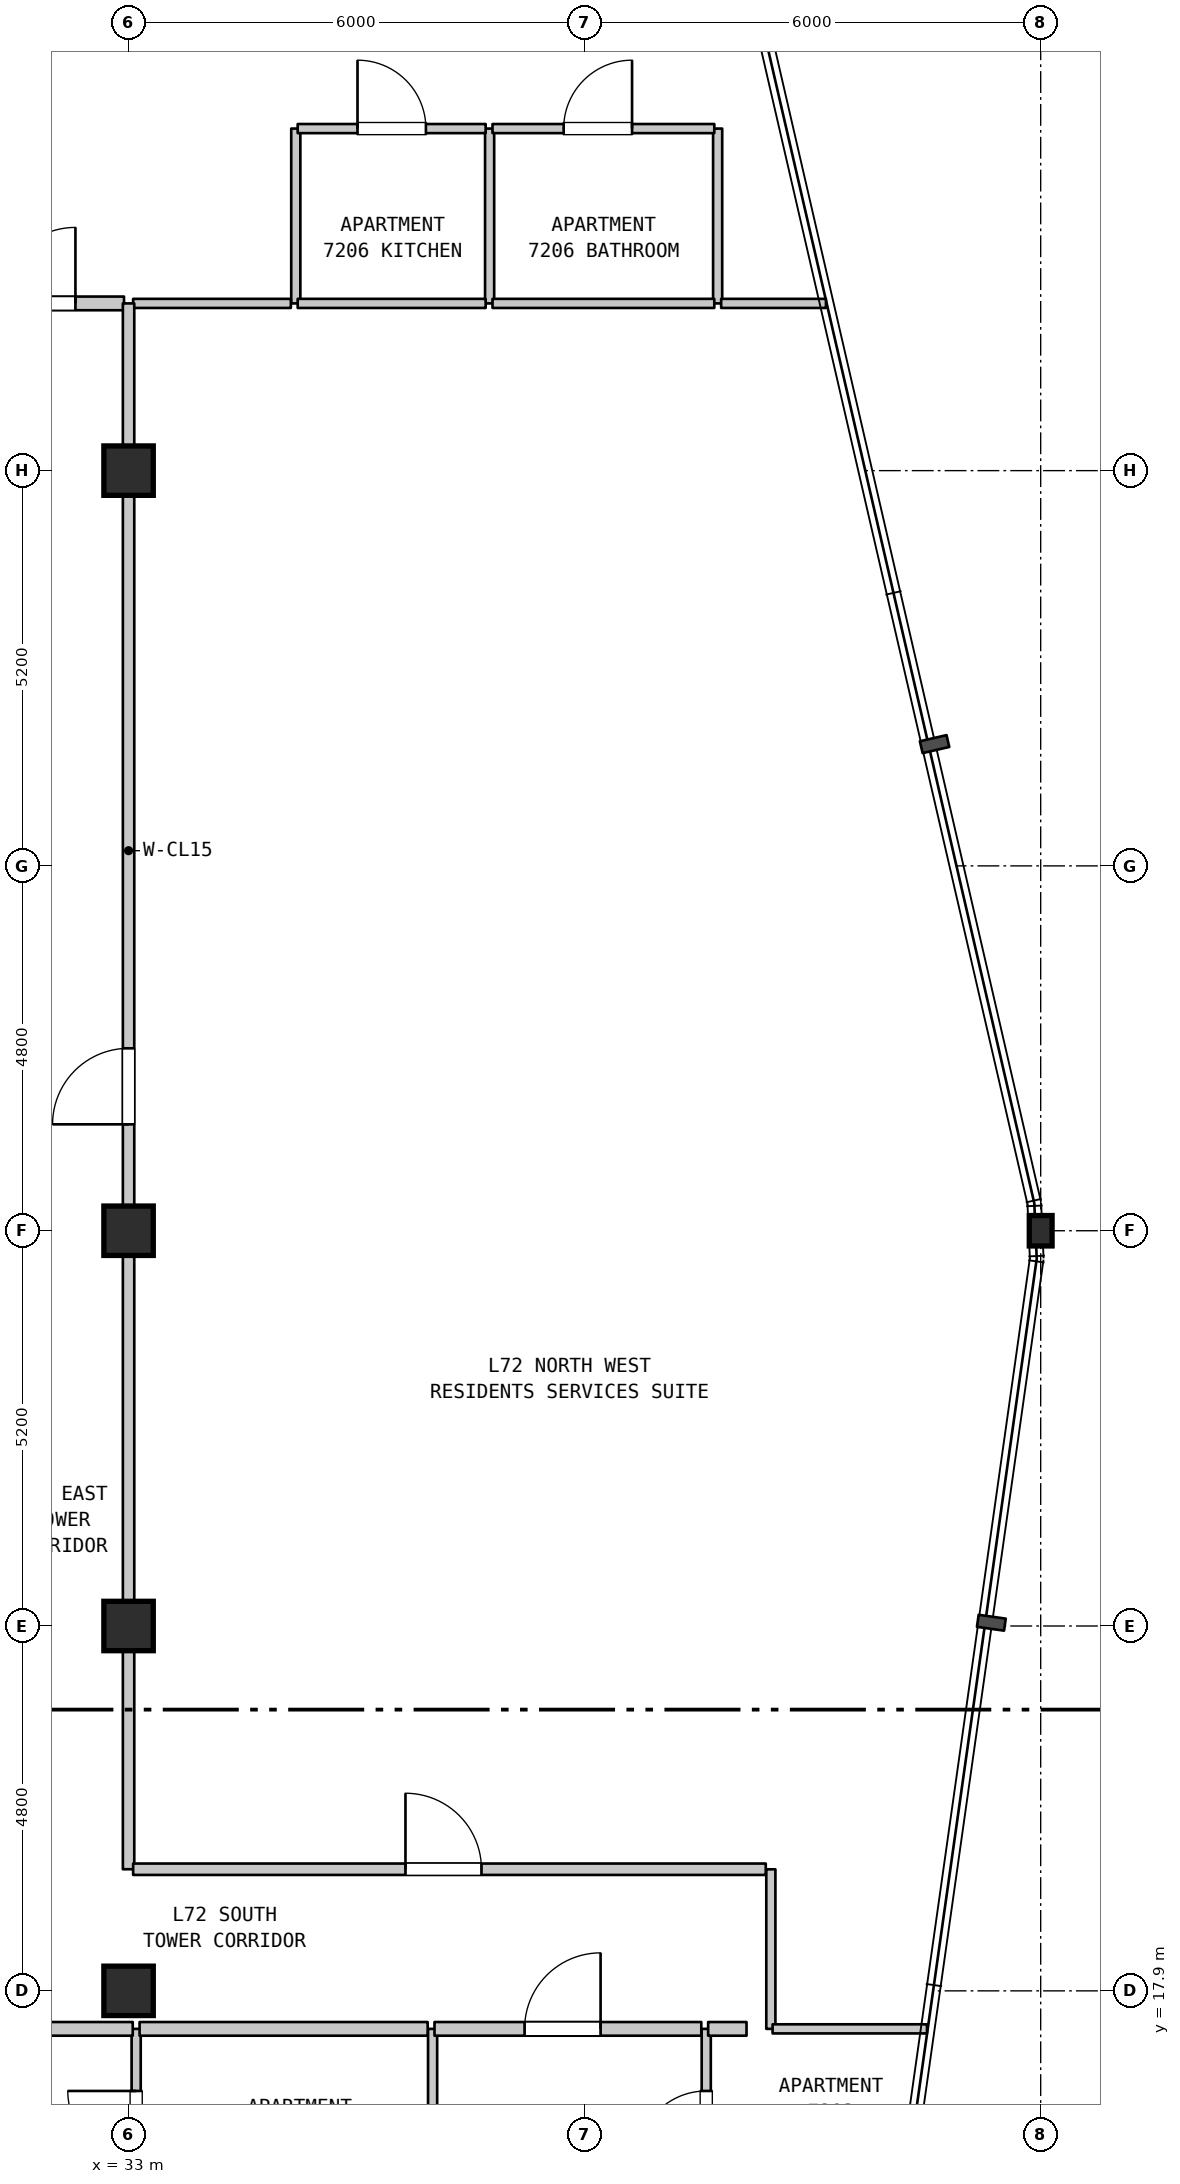
"""IFC4 building model, lengths in metres.
Left out: names, types, materials, properties, quantities, classifications, styles, units other than length and angle.
Written with IfcOpenShell. Run it as: python <this file> out.ifc"""

import sys

from ifc_helpers import new_model, si_unit, direction, frame, frame_2d, origin, origin_2d, place, context, subcontext, project, spatial, rectangle, i_section, extrude, element, fill, save


model = new_model("IFC4")
c1 = context("Model", 3, precision=1e-05, world=origin(), true_north=direction((0.0, 1.0)))
c2 = subcontext(c1, "Body", "Model", "MODEL_VIEW")
j1 = project(units=[si_unit("LENGTHUNIT", "METRE"), si_unit("PLANEANGLEUNIT", "RADIAN")], contexts=[c1])
p1 = place(None, origin())
s1 = spatial("IfcSite", under=j1, at=p1, CompositionType="ELEMENT")
p2 = place(p1, origin())
s2 = spatial("IfcBuilding", under=s1, at=p2, CompositionType="ELEMENT")
p3 = place(p2, frame((0.0, 0.0, 288.0)))
s3 = spatial("IfcBuildingStorey", under=s2, at=p3, CompositionType="ELEMENT", Elevation=288.0)
for number, where, z_axis, x_axis in (
    (1, (33.0, 17.9, 0.0), (0.0, 0.0, 1.0), (1.0, 0.0, 0.0)),
    (2, (33.0, 22.7, 0.0), (0.0, 0.0, 1.0), (1.0, 0.0, 0.0)),
    (3, (33.0, 27.9, 0.0), (0.0, 0.0, 1.0), (1.0, 0.0, 0.0)),
    (4, (33.0, 37.9, 0.0), (0.0, 0.0, 1.0), (1.0, 0.0, 0.0)),
):
    element("IfcColumn", number, at=place(p3, frame(where, z_axis=z_axis, x_axis=x_axis)), inside=s3, PredefinedType="COLUMN", context=c2, shape_type="SweptSolid", body=[
        extrude(rectangle(XDim=0.65, YDim=0.65, at=origin_2d()), origin(), (0.0, 0.0, 1.0), 3.7),
    ])
p4 = place(p3, frame((45.0, 27.9, 0.0), z_axis=(0.0, 0.0, 1.0), x_axis=(1.0, 0.0, 0.0)))
e5 = element("IfcColumn", 5, at=p4, inside=s3, PredefinedType="COLUMN", context=c2, shape_type="SweptSolid", body=[
    extrude(i_section(OverallWidth=0.3, OverallDepth=0.4, WebThickness=0.013, FlangeThickness=0.024, FilletRadius=0.027, at=origin_2d()), origin(), (0.0, 0.0, 1.0), 3.7),
])
p5 = place(p3, frame((33.0, 19.5, 0.0), z_axis=(0.0, 0.0, 1.0), x_axis=(0.0, 1.0, 0.0)))
e6 = element("IfcWall", 6, at=p5, inside=s3, PredefinedType="STANDARD", context=c2, shape_type="SweptSolid", body=[
    extrude(rectangle(XDim=8.4, YDim=0.15, at=frame_2d((4.2, 0.0))), origin(), (0.0, 0.0, 1.0), 3.1),
])
p6 = place(p3, frame((33.1, 15.008, 0.0), z_axis=(0.0, 0.0, 1.0), x_axis=(0.0, 1.0, 0.0)))
e7 = element("IfcWall", 7, at=p6, inside=s3, PredefinedType="PARTITIONING", context=c2, shape_type="SweptSolid", body=[
    extrude(rectangle(XDim=2.392, YDim=0.12, at=frame_2d((1.196, 0.0))), origin(), (0.0, 0.0, 1.0), 3.1),
])
p7 = place(p6, frame((0.675, 0.0, 0.0)))
e8 = element("IfcOpeningElement", 8, at=p7, cuts=e7, PredefinedType="OPENING", context=c2, shape_type="SweptSolid", body=[
    extrude(rectangle(XDim=0.9, YDim=2.1, at=frame_2d((0.45, 1.05))), frame((0.0, 0.07, 0.0), z_axis=(0.0, -1.0, 0.0), x_axis=(1.0, 0.0, 0.0)), (0.0, 0.0, 1.0), 0.14),
])
p8 = place(p3, frame((35.2, 40.1, 0.0), z_axis=(0.0, 0.0, 1.0), x_axis=(0.0, 1.0, 0.0)))
e9 = element("IfcWall", 9, at=p8, inside=s3, PredefinedType="PARTITIONING", context=c2, shape_type="SweptSolid", body=[
    extrude(rectangle(XDim=2.3, YDim=0.12, at=frame_2d((1.15, 0.0))), origin(), (0.0, 0.0, 1.0), 3.39),
])
p9 = place(p3, frame((37.0, 15.008, 0.0), z_axis=(0.0, 0.0, 1.0), x_axis=(0.0, 1.0, 0.0)))
e10 = element("IfcWall", 10, at=p9, inside=s3, PredefinedType="PARTITIONING", context=c2, shape_type="SweptSolid", body=[
    extrude(rectangle(XDim=2.392, YDim=0.12, at=frame_2d((1.196, 0.0))), origin(), (0.0, 0.0, 1.0), 3.39),
])
p10 = place(p3, frame((37.75, 40.1, 0.0), z_axis=(0.0, 0.0, 1.0), x_axis=(0.0, 1.0, 0.0)))
e11 = element("IfcWall", 11, at=p10, inside=s3, PredefinedType="PARTITIONING", context=c2, shape_type="SweptSolid", body=[
    extrude(rectangle(XDim=2.3, YDim=0.12, at=frame_2d((1.15, 0.0))), origin(), (0.0, 0.0, 1.0), 3.39),
])
p11 = place(p3, frame((40.6, 15.008, 0.0), z_axis=(0.0, 0.0, 1.0), x_axis=(0.0, 1.0, 0.0)))
e12 = element("IfcWall", 12, at=p11, inside=s3, PredefinedType="PARTITIONING", context=c2, shape_type="SweptSolid", body=[
    extrude(rectangle(XDim=2.392, YDim=0.12, at=frame_2d((1.196, 0.0))), origin(), (0.0, 0.0, 1.0), 3.39),
])
p12 = place(p11, frame((0.675, 0.0, 0.0)))
e13 = element("IfcOpeningElement", 13, at=p12, cuts=e12, PredefinedType="OPENING", context=c2, shape_type="SweptSolid", body=[
    extrude(rectangle(XDim=0.9, YDim=2.1, at=frame_2d((0.45, 1.05))), frame((0.0, 0.07, 0.0), z_axis=(0.0, -1.0, 0.0), x_axis=(1.0, 0.0, 0.0)), (0.0, 0.0, 1.0), 0.14),
])
p13 = place(p3, frame((40.75, 40.1, 0.0), z_axis=(0.0, 0.0, 1.0), x_axis=(0.0, 1.0, 0.0)))
e14 = element("IfcWall", 14, at=p13, inside=s3, PredefinedType="PARTITIONING", context=c2, shape_type="SweptSolid", body=[
    extrude(rectangle(XDim=2.3, YDim=0.12, at=frame_2d((1.15, 0.0))), origin(), (0.0, 0.0, 1.0), 3.39),
])
p14 = place(p3, frame((41.45, 17.4, 0.0), z_axis=(0.0, 0.0, 1.0), x_axis=(0.0, 1.0, 0.0)))
e15 = element("IfcWall", 15, at=p14, inside=s3, PredefinedType="PARTITIONING", context=c2, shape_type="SweptSolid", body=[
    extrude(rectangle(XDim=2.099, YDim=0.12, at=frame_2d((1.05, 0.0))), origin(), (0.0, 0.0, 1.0), 3.39),
])
p15 = place(p3, frame((29.545, 17.4, 0.0), z_axis=(0.0, 0.0, 1.0), x_axis=(1.0, 0.0, 0.0)))
e16 = element("IfcWall", 16, at=p15, inside=s3, PredefinedType="STANDARD", context=c2, shape_type="SweptSolid", body=[
    extrude(rectangle(XDim=3.51, YDim=0.18, at=frame_2d((1.755, 0.0))), origin(), (0.0, 0.0, 1.0), 3.39),
])
p16 = place(p15, frame((1.185, 0.0, 0.0)))
e17 = element("IfcOpeningElement", 17, at=p16, cuts=e16, PredefinedType="OPENING", context=c2, shape_type="SweptSolid", body=[
    extrude(rectangle(XDim=1.0, YDim=2.15, at=frame_2d((0.5, 1.075))), frame((0.0, 0.1, 0.0), z_axis=(0.0, -1.0, 0.0), x_axis=(1.0, 0.0, 0.0)), (0.0, 0.0, 1.0), 0.2),
])
p17 = place(p3, frame((33.145, 17.4, 0.0), z_axis=(0.0, 0.0, 1.0), x_axis=(1.0, 0.0, 0.0)))
e18 = element("IfcWall", 18, at=p17, inside=s3, PredefinedType="STANDARD", context=c2, shape_type="SweptSolid", body=[
    extrude(rectangle(XDim=3.79, YDim=0.18, at=frame_2d((1.895, 0.0))), origin(), (0.0, 0.0, 1.0), 3.39),
])
p18 = place(p3, frame((37.025, 17.4, 0.0), z_axis=(0.0, 0.0, 1.0), x_axis=(1.0, 0.0, 0.0)))
e19 = element("IfcWall", 19, at=p18, inside=s3, PredefinedType="STANDARD", context=c2, shape_type="SweptSolid", body=[
    extrude(rectangle(XDim=3.51, YDim=0.18, at=frame_2d((1.755, 0.0))), origin(), (0.0, 0.0, 1.0), 3.39),
])
p19 = place(p18, frame((1.185, 0.0, 0.0)))
e20 = element("IfcOpeningElement", 20, at=p19, cuts=e19, PredefinedType="OPENING", context=c2, shape_type="SweptSolid", body=[
    extrude(rectangle(XDim=1.0, YDim=2.15, at=frame_2d((0.5, 1.075))), frame((0.0, 0.1, 0.0), z_axis=(0.0, -1.0, 0.0), x_axis=(1.0, 0.0, 0.0)), (0.0, 0.0, 1.0), 0.2),
])
p20 = place(p3, frame((40.625, 17.4, 0.0), z_axis=(0.0, 0.0, 1.0), x_axis=(1.0, 0.0, 0.0)))
e21 = element("IfcWall", 21, at=p20, inside=s3, PredefinedType="STANDARD", context=c2, shape_type="SweptSolid", body=[
    extrude(rectangle(XDim=0.505, YDim=0.18, at=frame_2d((0.252, 0.0))), origin(), (0.0, 0.0, 1.0), 3.39),
])
p21 = place(p3, frame((41.473, 17.4, 0.0), z_axis=(0.0, 0.0, 1.0), x_axis=(1.0, 0.0, 0.0)))
e22 = element("IfcWall", 22, at=p21, inside=s3, PredefinedType="PARTITIONING", context=c2, shape_type="SweptSolid", body=[
    extrude(rectangle(XDim=2.031, YDim=0.12, at=frame_2d((1.016, 0.0))), origin(), (0.0, 0.0, 1.0), 3.39),
])
p22 = place(p3, frame((33.06, 19.5, 0.0), z_axis=(0.0, 0.0, 1.0), x_axis=(1.0, 0.0, 0.0)))
e23 = element("IfcWall", 23, at=p22, inside=s3, PredefinedType="STANDARD", context=c2, shape_type="SweptSolid", body=[
    extrude(rectangle(XDim=8.323, YDim=0.15, at=frame_2d((4.162, 0.0))), origin(), (0.0, 0.0, 1.0), 3.39),
])
p23 = place(p22, frame((3.583, 0.0, 0.0)))
e24 = element("IfcOpeningElement", 24, at=p23, cuts=e23, PredefinedType="OPENING", context=c2, shape_type="SweptSolid", body=[
    extrude(rectangle(XDim=1.0, YDim=2.15, at=frame_2d((0.5, 1.075))), frame((0.0, 0.085, 0.0), z_axis=(0.0, -1.0, 0.0), x_axis=(1.0, 0.0, 0.0)), (0.0, 0.0, 1.0), 0.17),
])
p24 = place(p3, frame((30.395, 40.1, 0.0), z_axis=(0.0, 0.0, 1.0), x_axis=(1.0, 0.0, 0.0)))
e25 = element("IfcWall", 25, at=p24, inside=s3, PredefinedType="STANDARD", context=c2, shape_type="SweptSolid", body=[
    extrude(rectangle(XDim=2.545, YDim=0.18, at=frame_2d((1.272, 0.0))), origin(), (0.0, 0.0, 1.0), 3.39),
])
p25 = place(p24, frame((0.906, 0.0, 0.0)))
e26 = element("IfcOpeningElement", 26, at=p25, cuts=e25, PredefinedType="OPENING", context=c2, shape_type="SweptSolid", body=[
    extrude(rectangle(XDim=1.0, YDim=2.15, at=frame_2d((0.5, 1.075))), frame((0.0, 0.1, 0.0), z_axis=(0.0, -1.0, 0.0), x_axis=(1.0, 0.0, 0.0)), (0.0, 0.0, 1.0), 0.2),
])
p26 = place(p3, frame((33.06, 40.1, 0.0), z_axis=(0.0, 0.0, 1.0), x_axis=(1.0, 0.0, 0.0)))
e27 = element("IfcWall", 27, at=p26, inside=s3, PredefinedType="PARTITIONING", context=c2, shape_type="SweptSolid", body=[
    extrude(rectangle(XDim=2.075, YDim=0.12, at=frame_2d((1.038, 0.0))), origin(), (0.0, 0.0, 1.0), 3.39),
])
p27 = place(p3, frame((35.225, 40.1, 0.0), z_axis=(0.0, 0.0, 1.0), x_axis=(1.0, 0.0, 0.0)))
e28 = element("IfcWall", 28, at=p27, inside=s3, PredefinedType="PARTITIONING", context=c2, shape_type="SweptSolid", body=[
    extrude(rectangle(XDim=2.473, YDim=0.12, at=frame_2d((1.236, 0.0))), origin(), (0.0, 0.0, 1.0), 3.39),
])
p28 = place(p3, frame((37.788, 40.1, 0.0), z_axis=(0.0, 0.0, 1.0), x_axis=(1.0, 0.0, 0.0)))
e29 = element("IfcWall", 29, at=p28, inside=s3, PredefinedType="PARTITIONING", context=c2, shape_type="SweptSolid", body=[
    extrude(rectangle(XDim=2.918, YDim=0.12, at=frame_2d((1.459, 0.0))), origin(), (0.0, 0.0, 1.0), 3.39),
])
p29 = place(p3, frame((40.796, 40.1, 0.0), z_axis=(0.0, 0.0, 1.0), x_axis=(1.0, 0.0, 0.0)))
e30 = element("IfcWall", 30, at=p29, inside=s3, PredefinedType="PARTITIONING", context=c2, shape_type="SweptSolid", body=[
    extrude(rectangle(XDim=1.379, YDim=0.12, at=frame_2d((0.689, 0.0))), origin(), (0.0, 0.0, 1.0), 3.39),
])
p30 = place(p3, frame((35.225, 42.4, 0.0), z_axis=(0.0, 0.0, 1.0), x_axis=(1.0, 0.0, 0.0)))
e31 = element("IfcWall", 31, at=p30, inside=s3, PredefinedType="PARTITIONING", context=c2, shape_type="SweptSolid", body=[
    extrude(rectangle(XDim=2.473, YDim=0.12, at=frame_2d((1.236, 0.0))), origin(), (0.0, 0.0, 1.0), 3.39),
])
p31 = place(p30, frame((0.787, 0.0, 0.0)))
e32 = element("IfcOpeningElement", 32, at=p31, cuts=e31, PredefinedType="OPENING", context=c2, shape_type="SweptSolid", body=[
    extrude(rectangle(XDim=0.9, YDim=2.15, at=frame_2d((0.45, 1.075))), frame((0.0, 0.07, 0.0), z_axis=(0.0, -1.0, 0.0), x_axis=(1.0, 0.0, 0.0)), (0.0, 0.0, 1.0), 0.14),
])
p32 = place(p3, frame((37.788, 42.4, 0.0), z_axis=(0.0, 0.0, 1.0), x_axis=(1.0, 0.0, 0.0)))
e33 = element("IfcWall", 33, at=p32, inside=s3, PredefinedType="PARTITIONING", context=c2, shape_type="SweptSolid", body=[
    extrude(rectangle(XDim=2.918, YDim=0.12, at=frame_2d((1.459, 0.0))), origin(), (0.0, 0.0, 1.0), 3.39),
])
p33 = place(p32, frame((0.936, 0.0, 0.0)))
e34 = element("IfcOpeningElement", 34, at=p33, cuts=e33, PredefinedType="OPENING", context=c2, shape_type="SweptSolid", body=[
    extrude(rectangle(XDim=0.9, YDim=2.1, at=frame_2d((0.45, 1.05))), frame((0.0, 0.07, 0.0), z_axis=(0.0, -1.0, 0.0), x_axis=(1.0, 0.0, 0.0)), (0.0, 0.0, 1.0), 0.14),
])
p34 = place(p3, frame((33.0, 27.9, 0.0), z_axis=(0.0, 0.0, 1.0), x_axis=(0.0, 1.0, 0.0)))
e35 = element("IfcWall", 35, at=p34, inside=s3, PredefinedType="STANDARD", context=c2, shape_type="SweptSolid", body=[
    extrude(rectangle(XDim=10.0, YDim=0.15, at=frame_2d((5.0, 0.0))), origin(), (0.0, 0.0, 1.0), 2.89),
])
p35 = place(p34, frame((1.4, 0.0, 0.0)))
e36 = element("IfcOpeningElement", 36, at=p35, cuts=e35, PredefinedType="OPENING", context=c2, shape_type="SweptSolid", body=[
    extrude(rectangle(XDim=1.0, YDim=2.15, at=frame_2d((0.5, 1.075))), frame((0.0, 0.085, 0.0), z_axis=(0.0, -1.0, 0.0), x_axis=(1.0, 0.0, 0.0)), (0.0, 0.0, 1.0), 0.17),
])
p36 = place(p3, frame((33.0, 37.9, 0.0), z_axis=(0.0, 0.0, 1.0), x_axis=(0.0, 1.0, 0.0)))
e37 = element("IfcWall", 37, at=p36, inside=s3, PredefinedType="STANDARD", context=c2, shape_type="SweptSolid", body=[
    extrude(rectangle(XDim=2.2, YDim=0.15, at=frame_2d((1.1, 0.0))), origin(), (0.0, 0.0, 1.0), 2.79),
])
p37 = place(p35, origin())
e38 = element("IfcDoor", 38, at=p37, inside=s3, OperationType="SINGLE_SWING_LEFT", PredefinedType="DOOR", context=c2, shape_type="SweptSolid", body=[
    extrude(rectangle(XDim=1.0, YDim=2.15, at=frame_2d((0.5, 1.075))), frame((0.0, 0.025, 0.0), z_axis=(0.0, -1.0, 0.0), x_axis=(1.0, 0.0, 0.0)), (0.0, 0.0, 1.0), 0.05),
])
fill(e36, e38)
p38 = place(p7, origin())
e39 = element("IfcDoor", 39, at=p38, inside=s3, OperationType="SINGLE_SWING_RIGHT", PredefinedType="DOOR", context=c2, shape_type="SweptSolid", body=[
    extrude(rectangle(XDim=0.9, YDim=2.1, at=frame_2d((0.45, 1.05))), frame((0.0, 0.025, 0.0), z_axis=(0.0, -1.0, 0.0), x_axis=(1.0, 0.0, 0.0)), (0.0, 0.0, 1.0), 0.05),
])
fill(e8, e39)
p39 = place(p12, origin())
e40 = element("IfcDoor", 40, at=p39, inside=s3, OperationType="SINGLE_SWING_LEFT", PredefinedType="DOOR", context=c2, shape_type="SweptSolid", body=[
    extrude(rectangle(XDim=0.9, YDim=2.1, at=frame_2d((0.45, 1.05))), frame((0.0, 0.025, 0.0), z_axis=(0.0, -1.0, 0.0), x_axis=(1.0, 0.0, 0.0)), (0.0, 0.0, 1.0), 0.05),
])
fill(e13, e40)
p40 = place(p19, origin())
e41 = element("IfcDoor", 41, at=p40, inside=s3, OperationType="SINGLE_SWING_RIGHT", PredefinedType="DOOR", context=c2, shape_type="SweptSolid", body=[
    extrude(rectangle(XDim=1.0, YDim=2.15, at=frame_2d((0.5, 1.075))), frame((0.0, 0.025, 0.0), z_axis=(0.0, -1.0, 0.0), x_axis=(1.0, 0.0, 0.0)), (0.0, 0.0, 1.0), 0.05),
])
fill(e20, e41)
p41 = place(p23, origin())
e42 = element("IfcDoor", 42, at=p41, inside=s3, OperationType="SINGLE_SWING_LEFT", PredefinedType="DOOR", context=c2, shape_type="SweptSolid", body=[
    extrude(rectangle(XDim=1.0, YDim=2.15, at=frame_2d((0.5, 1.075))), frame((0.0, 0.025, 0.0), z_axis=(0.0, -1.0, 0.0), x_axis=(1.0, 0.0, 0.0)), (0.0, 0.0, 1.0), 0.05),
])
fill(e24, e42)
p42 = place(p25, origin())
e43 = element("IfcDoor", 43, at=p42, inside=s3, OperationType="SINGLE_SWING_RIGHT", PredefinedType="DOOR", context=c2, shape_type="SweptSolid", body=[
    extrude(rectangle(XDim=1.0, YDim=2.15, at=frame_2d((0.5, 1.075))), frame((0.0, 0.025, 0.0), z_axis=(0.0, -1.0, 0.0), x_axis=(1.0, 0.0, 0.0)), (0.0, 0.0, 1.0), 0.05),
])
fill(e26, e43)
p43 = place(p31, origin())
e44 = element("IfcDoor", 44, at=p43, inside=s3, OperationType="SINGLE_SWING_LEFT", PredefinedType="DOOR", context=c2, shape_type="SweptSolid", body=[
    extrude(rectangle(XDim=0.9, YDim=2.15, at=frame_2d((0.45, 1.075))), frame((0.0, 0.025, 0.0), z_axis=(0.0, -1.0, 0.0), x_axis=(1.0, 0.0, 0.0)), (0.0, 0.0, 1.0), 0.05),
])
fill(e32, e44)
p44 = place(p33, origin())
e45 = element("IfcDoor", 45, at=p44, inside=s3, OperationType="SINGLE_SWING_RIGHT", PredefinedType="DOOR", context=c2, shape_type="SweptSolid", body=[
    extrude(rectangle(XDim=0.9, YDim=2.1, at=frame_2d((0.45, 1.05))), frame((0.0, 0.025, 0.0), z_axis=(0.0, -1.0, 0.0), x_axis=(1.0, 0.0, 0.0)), (0.0, 0.0, 1.0), 0.05),
])
fill(e34, e45)
save(model, sys.argv[1])
